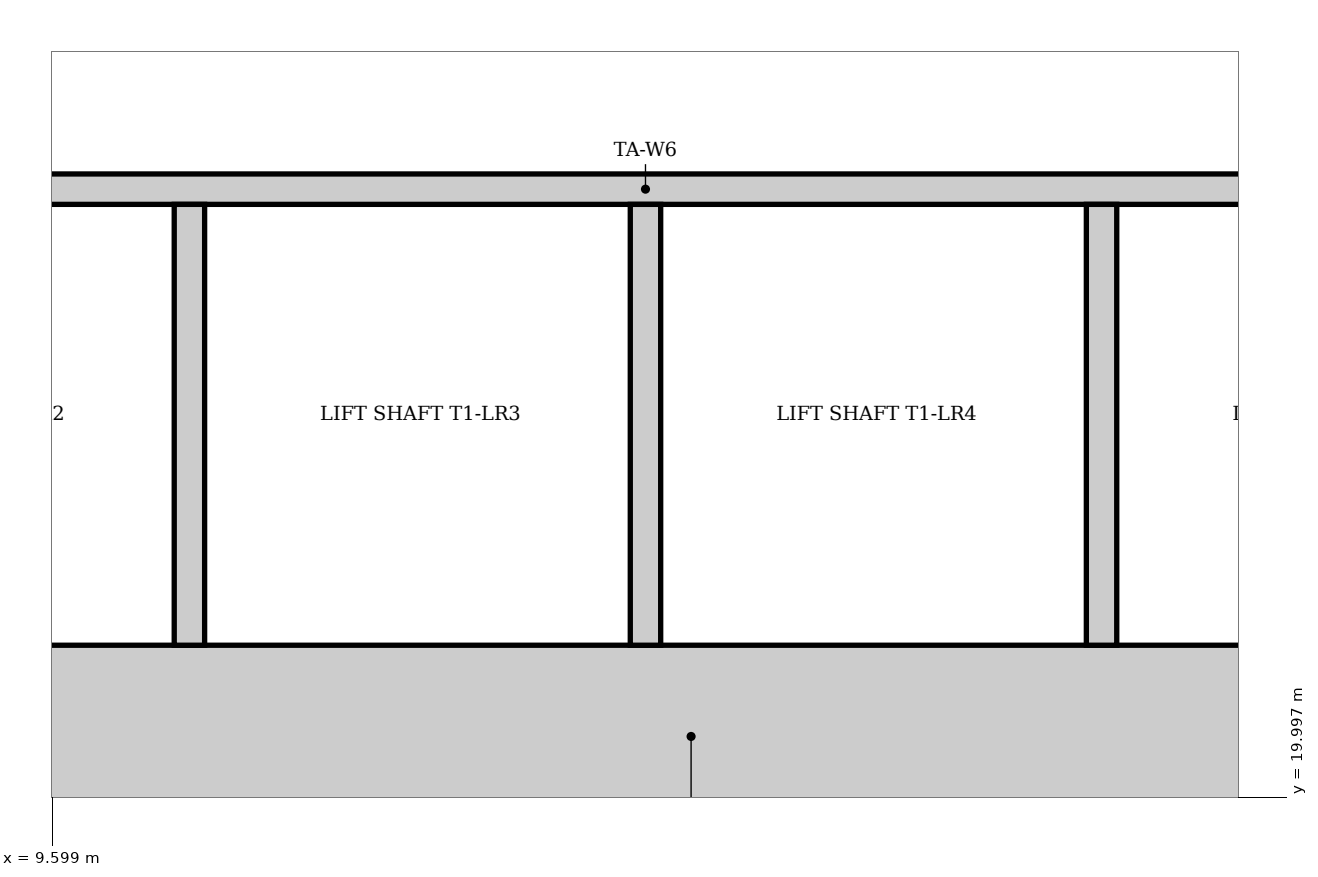
"""IFC4 building model, lengths in metres.
Left out: names, types, materials, properties, quantities, classifications, styles, units other than length and angle.
Written with IfcOpenShell. Run it as: python <this file> out.ifc"""

import sys

from ifc_helpers import new_model, si_unit, direction, frame, frame_2d, origin, place, context, subcontext, project, spatial, rectangle, extrude, element, save


model = new_model("IFC4")
c1 = context("Model", 3, precision=1e-05, world=origin(), true_north=direction((0.0, 1.0)))
c2 = subcontext(c1, "Body", "Model", "MODEL_VIEW")
j1 = project(units=[si_unit("LENGTHUNIT", "METRE"), si_unit("PLANEANGLEUNIT", "RADIAN")], contexts=[c1])
p1 = place(None, origin())
s1 = spatial("IfcSite", under=j1, at=p1, CompositionType="ELEMENT")
p2 = place(p1, origin())
s2 = spatial("IfcBuilding", under=s1, at=p2, CompositionType="ELEMENT")
p3 = place(p2, frame((0.0, 0.0, -5.0)))
s3 = spatial("IfcBuildingStorey", under=s2, at=p3, CompositionType="ELEMENT", Elevation=-5.0)
p4 = place(p3, frame((3.9, 20.4, 0.0), z_axis=(0.0, 0.0, 1.0), x_axis=(1.0, 0.0, 0.0)))
e1 = element("IfcWall", 1, at=p4, inside=s3, PredefinedType="SOLIDWALL", context=c2, shape_type="SweptSolid", body=[
    extrude(rectangle(XDim=19.8, YDim=1.2, at=frame_2d((9.9, 0.0))), origin(), (0.0, 0.0, 1.0), 5.0),
])
p5 = place(p3, frame((4.5, 24.0, 0.0), z_axis=(0.0, 0.0, 1.0), x_axis=(1.0, 0.0, 0.0)))
e2 = element("IfcWall", 2, at=p5, inside=s3, PredefinedType="PARTITIONING", context=c2, shape_type="SweptSolid", body=[
    extrude(rectangle(XDim=18.0, YDim=0.2, at=frame_2d((9.0, 0.0))), origin(), (0.0, 0.0, 1.0), 4.7),
])
for number, where, z_axis, x_axis in (
    (3, (10.5, 21.0, 0.0), (0.0, 0.0, 1.0), (0.0, 1.0, 0.0)),
    (4, (13.5, 21.0, 0.0), (0.0, 0.0, 1.0), (0.0, 1.0, 0.0)),
    (5, (16.5, 21.0, 0.0), (0.0, 0.0, 1.0), (0.0, 1.0, 0.0)),
):
    element("IfcWall", number, at=place(p3, frame(where, z_axis=z_axis, x_axis=x_axis)), inside=s3, PredefinedType="PARTITIONING", context=c2, shape_type="SweptSolid", body=[
        extrude(rectangle(XDim=2.9, YDim=0.2, at=frame_2d((1.45, 0.0))), origin(), (0.0, 0.0, 1.0), 4.7),
    ])
save(model, sys.argv[1])
